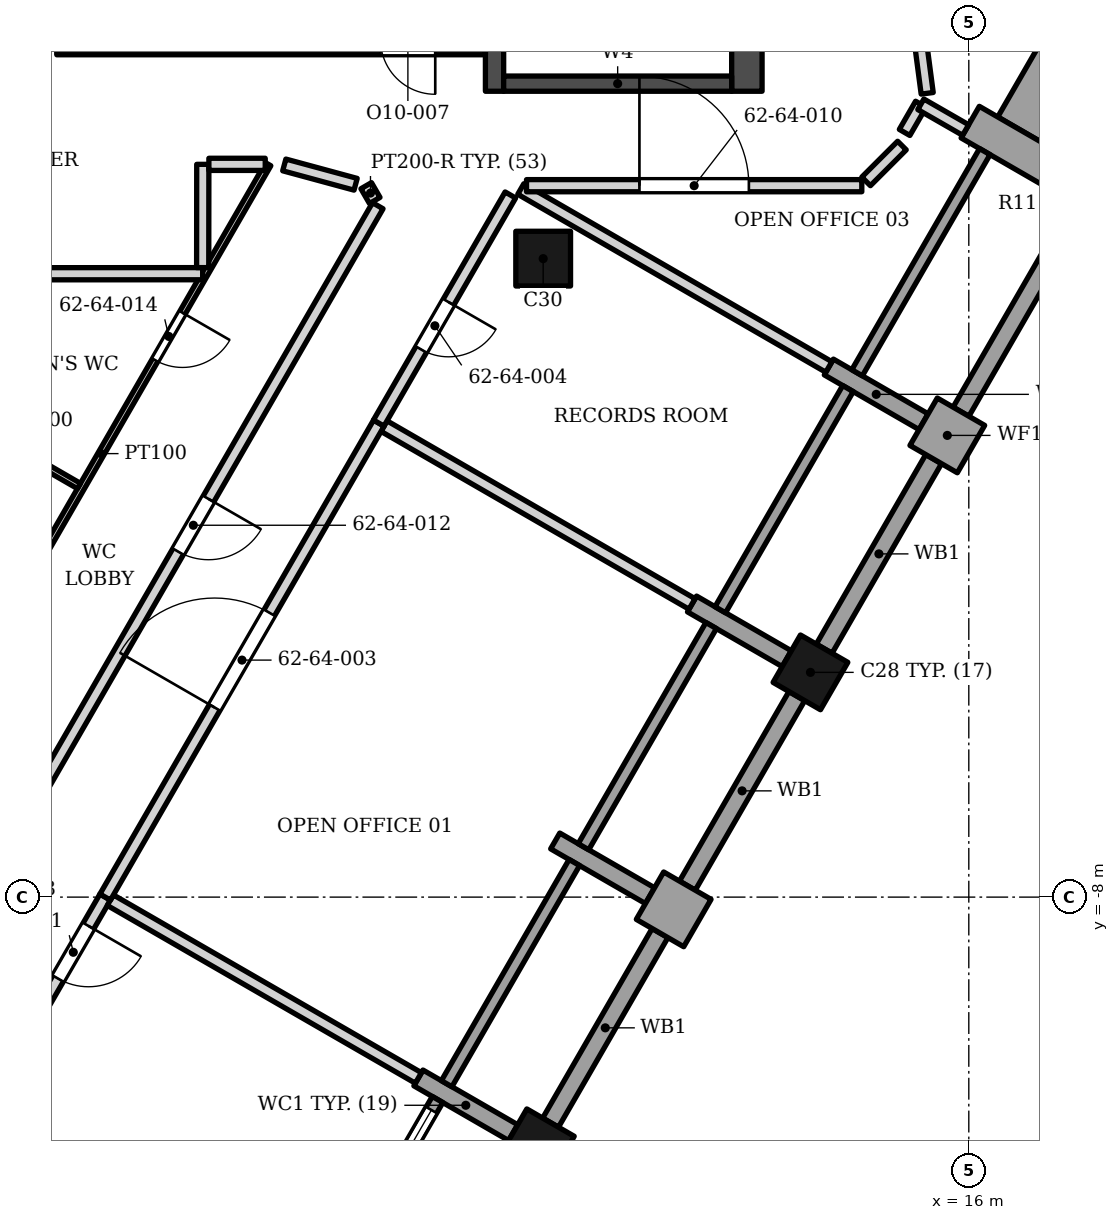
"""IFC4 building model, lengths in metres.
Left out: names, types, materials, properties, quantities, classifications, styles, units other than length and angle.
Written with IfcOpenShell. Run it as: python <this file> out.ifc"""

import sys

from ifc_helpers import new_model, si_unit, direction, frame, frame_2d, origin, origin_2d, place, context, subcontext, project, spatial, polyline, rectangle, outline, extrude, element, fill, save


model = new_model("IFC4")
c1 = context("Model", 3, precision=1e-05, world=origin(), true_north=direction((0.0, 1.0)))
c2 = subcontext(c1, "Body", "Model", "MODEL_VIEW")
j1 = project(units=[si_unit("LENGTHUNIT", "METRE"), si_unit("PLANEANGLEUNIT", "RADIAN")], contexts=[c1])
p1 = place(None, origin())
s1 = spatial("IfcSite", under=j1, at=p1, CompositionType="ELEMENT")
p2 = place(p1, origin())
s2 = spatial("IfcBuilding", under=s1, at=p2, CompositionType="ELEMENT")
p3 = place(p2, frame((0.0, 0.0, 259.9)))
s3 = spatial("IfcBuildingStorey", under=s2, at=p3, CompositionType="ELEMENT", Elevation=259.9)
p4 = place(p3, frame((12.35, 5.253, 0.0), z_axis=(0.0, 0.0, 1.0), x_axis=(0.0, 1.0, 0.0)))
e1 = element("IfcWall", 1, at=p4, inside=s3, PredefinedType="SHEAR", context=c2, shape_type="SweptSolid", body=[
    extrude(rectangle(XDim=13.8, YDim=0.5, at=frame_2d((6.9, 0.0))), origin(), (0.0, 0.0, 1.0), 3.9),
])
p5 = place(p3, frame((8.2, 5.253, 0.0), z_axis=(0.0, 0.0, 1.0), x_axis=(0.0, 1.0, 0.0)))
e2 = element("IfcWall", 2, at=p5, inside=s3, PredefinedType="SHEAR", context=c2, shape_type="SweptSolid", body=[
    extrude(rectangle(XDim=13.3, YDim=0.3, at=frame_2d((6.65, 0.0))), origin(), (0.0, 0.0, 1.0), 3.9),
])
p6 = place(p5, frame((7.1, 0.0, 0.0)))
e3 = element("IfcOpeningElement", 3, at=p6, cuts=e2, PredefinedType="OPENING", context=c2, shape_type="SweptSolid", body=[
    extrude(rectangle(XDim=1.4, YDim=2.1, at=frame_2d((0.7, 1.05))), frame((0.0, 0.16, 0.0), z_axis=(0.0, -1.0, 0.0), x_axis=(1.0, 0.0, 0.0)), (0.0, 0.0, 1.0), 0.32),
])
p7 = place(p5, frame((5.05, 0.0, 0.0)))
e4 = element("IfcOpeningElement", 4, at=p7, cuts=e2, PredefinedType="OPENING", context=c2, shape_type="SweptSolid", body=[
    extrude(rectangle(XDim=1.4, YDim=2.1, at=frame_2d((0.7, 1.05))), frame((0.0, 0.16, 0.0), z_axis=(0.0, -1.0, 0.0), x_axis=(1.0, 0.0, 0.0)), (0.0, 0.0, 1.0), 0.32),
])
p8 = place(p3, frame((8.35, 5.378, 0.0), z_axis=(0.0, 0.0, 1.0), x_axis=(1.0, 0.0, 0.0)))
e5 = element("IfcWall", 5, at=p8, inside=s3, PredefinedType="SHEAR", context=c2, shape_type="SweptSolid", body=[
    extrude(rectangle(XDim=3.75, YDim=0.25, at=frame_2d((1.875, 0.0))), origin(), (0.0, 0.0, 1.0), 3.9),
])
p9 = place(p3, frame((1.0, 6.103, 0.0), z_axis=(0.0, 0.0, 1.0), x_axis=(1.0, 0.0, 0.0)))
e6 = element("IfcWall", 6, at=p9, inside=s3, PredefinedType="SHEAR", context=c2, shape_type="SweptSolid", body=[
    extrude(rectangle(XDim=7.05, YDim=0.5, at=frame_2d((3.525, 0.0))), origin(), (0.0, 0.0, 1.0), 3.9),
])
p10 = place(p9, frame((5.325, 0.0, 0.0)))
e7 = element("IfcOpeningElement", 7, at=p10, cuts=e6, PredefinedType="OPENING", context=c2, shape_type="SweptSolid", body=[
    extrude(rectangle(XDim=0.9, YDim=2.1, at=frame_2d((0.45, 1.05))), frame((0.0, 0.26, 0.0), z_axis=(0.0, -1.0, 0.0), x_axis=(1.0, 0.0, 0.0)), (0.0, 0.0, 1.0), 0.52),
])
for number, where, z_axis, x_axis in (
    (8, (9.0, 2.5, 0.0), (0.0, 0.0, 1.0), (1.0, 0.0, 0.0)),
    (9, (8.896, -12.098, 0.0), (0.0, 0.0, 1.0), (0.5, 0.866, 0.0)),
    (10, (13.396, -4.304, 0.0), (0.0, 0.0, 1.0), (0.5, 0.866, 0.0)),
):
    element("IfcColumn", number, at=place(p3, frame(where, z_axis=z_axis, x_axis=x_axis)), inside=s3, PredefinedType="COLUMN", context=c2, shape_type="SweptSolid", body=[
        extrude(rectangle(XDim=0.9, YDim=0.9, at=origin_2d()), origin(), (0.0, 0.0, 1.0), 3.9),
    ])
p11 = place(p3, frame((6.948, -10.973, 0.0), z_axis=(0.0, 0.0, 1.0), x_axis=(0.866038726271, -0.499976924066, 0.0)))
e11 = element("IfcWall", 11, at=p11, inside=s3, PredefinedType="SOLIDWALL", context=c2, shape_type="SweptSolid", body=[
    extrude(rectangle(XDim=1.799, YDim=0.3, at=frame_2d((0.9, 0.0))), origin(), (0.0, 0.0, 1.0), 2.95),
])
p12 = place(p3, frame((10.921, -8.591, 0.0), z_axis=(0.0, 0.0, 1.0), x_axis=(0.500223362819, 0.865896406789, 0.0)))
e12 = element("IfcWall", 12, at=p12, inside=s3, PredefinedType="SOLIDWALL", context=c2, shape_type="SweptSolid", body=[
    extrude(rectangle(XDim=0.9, YDim=0.9, at=frame_2d((0.45, 0.0))), origin(), (0.0, 0.0, 1.0), 3.0),
])
p13 = place(p3, frame((10.757, -7.976, 0.0), z_axis=(0.0, 0.0, 1.0), x_axis=(-0.865989075817, 0.500062916607, 0.0)))
e13 = element("IfcWall", 13, at=p13, inside=s3, PredefinedType="SOLIDWALL", context=c2, shape_type="SweptSolid", body=[
    extrude(rectangle(XDim=1.8, YDim=0.3, at=frame_2d((0.9, 0.0))), origin(), (0.0, 0.0, 1.0), 3.0),
])
p14 = place(p3, frame((13.006, -4.079, 0.0), z_axis=(0.0, 0.0, 1.0), x_axis=(-0.866038726271, 0.499976924066, 0.0)))
e14 = element("IfcWall", 14, at=p14, inside=s3, PredefinedType="SOLIDWALL", context=c2, shape_type="SweptSolid", body=[
    extrude(rectangle(XDim=1.799, YDim=0.3, at=frame_2d((0.9, 0.0))), origin(), (0.0, 0.0, 1.0), 3.0),
])
p15 = place(p3, frame((15.257, -0.182, 0.0), z_axis=(0.0, 0.0, 1.0), x_axis=(0.865896406789, -0.500223362819, 0.0)))
e15 = element("IfcWall", 15, at=p15, inside=s3, PredefinedType="SOLIDWALL", context=c2, shape_type="SweptSolid", body=[
    extrude(rectangle(XDim=0.9, YDim=0.9, at=frame_2d((0.45, 0.0))), origin(), (0.0, 0.0, 1.0), 3.0),
])
p16 = place(p3, frame((15.257, -0.182, 0.0), z_axis=(0.0, 0.0, 1.0), x_axis=(-0.866047807691, 0.499961193289, 0.0)))
e16 = element("IfcWall", 16, at=p16, inside=s3, PredefinedType="SOLIDWALL", context=c2, shape_type="SweptSolid", body=[
    extrude(rectangle(XDim=1.8, YDim=0.3, at=frame_2d((0.9, 0.0))), origin(), (0.0, 0.0, 1.0), 3.0),
])
p17 = place(p3, frame((16.023, 4.745, 0.0), z_axis=(0.0, 0.0, 1.0), x_axis=(0.865989075817, -0.500062916607, 0.0)))
e17 = element("IfcWall", 17, at=p17, inside=s3, PredefinedType="SOLIDWALL", context=c2, shape_type="SweptSolid", body=[
    extrude(rectangle(XDim=1.8, YDim=0.6, at=frame_2d((0.9, 0.0))), origin(), (0.0, 0.0, 1.0), 2.95),
])
p18 = place(p3, frame((5.163, -14.966, 0.0), z_axis=(0.0, 0.0, 1.0), x_axis=(0.500027713859, 0.866009402589, 0.0)))
e18 = element("IfcWall", 18, at=p18, inside=s3, PredefinedType="ELEMENTEDWALL", context=c2, shape_type="SweptSolid", body=[
    extrude(rectangle(XDim=4.2, YDim=0.2, at=frame_2d((2.1, 0.0))), origin(), (0.0, 0.0, 1.0), 2.95),
])
p19 = place(p18, frame((0.2, 0.0, 0.45)))
e19 = element("IfcOpeningElement", 19, at=p19, cuts=e18, PredefinedType="OPENING", context=c2, shape_type="SweptSolid", body=[
    extrude(rectangle(XDim=3.8, YDim=2.25, at=frame_2d((1.9, 1.125))), frame((0.0, 0.11, 0.0), z_axis=(0.0, -1.0, 0.0), x_axis=(1.0, 0.0, 0.0)), (0.0, 0.0, 1.0), 0.22),
])
p20 = place(p3, frame((9.122, -11.709, 0.0), z_axis=(0.0, 0.0, 1.0), x_axis=(0.499961193289, 0.866047807691, 0.0)))
e20 = element("IfcWall", 20, at=p20, inside=s3, PredefinedType="SOLIDWALL", context=c2, shape_type="SweptSolid", body=[
    extrude(rectangle(XDim=3.6, YDim=0.3, at=frame_2d((1.8, 0.0))), origin(), (0.0, 0.0, 1.0), 3.0),
])
p21 = place(p3, frame((7.413, -11.068, 0.0), z_axis=(0.0, 0.0, 1.0), x_axis=(0.500027713859, 0.866009402589, 0.0)))
e21 = element("IfcWall", 21, at=p21, inside=s3, PredefinedType="ELEMENTEDWALL", context=c2, shape_type="SweptSolid", body=[
    extrude(rectangle(XDim=4.2, YDim=0.2, at=frame_2d((2.1, 0.0))), origin(), (0.0, 0.0, 1.0), 3.0),
])
p22 = place(p3, frame((11.372, -7.812, 0.0), z_axis=(0.0, 0.0, 1.0), x_axis=(0.499961193289, 0.866047807691, 0.0)))
e22 = element("IfcWall", 22, at=p22, inside=s3, PredefinedType="SOLIDWALL", context=c2, shape_type="SweptSolid", body=[
    extrude(rectangle(XDim=3.6, YDim=0.3, at=frame_2d((1.8, 0.0))), origin(), (0.0, 0.0, 1.0), 3.0),
])
p23 = place(p3, frame((9.663, -7.171, 0.0), z_axis=(0.0, 0.0, 1.0), x_axis=(0.500002543286, 0.866023935413, 0.0)))
e23 = element("IfcWall", 23, at=p23, inside=s3, PredefinedType="ELEMENTEDWALL", context=c2, shape_type="SweptSolid", body=[
    extrude(rectangle(XDim=4.2, YDim=0.2, at=frame_2d((2.1, 0.0))), origin(), (0.0, 0.0, 1.0), 3.0),
])
p24 = place(p3, frame((13.622, -3.914, 0.0), z_axis=(0.0, 0.0, 1.0), x_axis=(0.499961193289, 0.866047807691, 0.0)))
e24 = element("IfcWall", 24, at=p24, inside=s3, PredefinedType="SOLIDWALL", context=c2, shape_type="SweptSolid", body=[
    extrude(rectangle(XDim=3.6, YDim=0.3, at=frame_2d((1.8, 0.0))), origin(), (0.0, 0.0, 1.0), 3.0),
])
p25 = place(p3, frame((11.913, -3.274, 0.0), z_axis=(0.0, 0.0, 1.0), x_axis=(0.500027713859, 0.866009402589, 0.0)))
e25 = element("IfcWall", 25, at=p25, inside=s3, PredefinedType="ELEMENTEDWALL", context=c2, shape_type="SweptSolid", body=[
    extrude(rectangle(XDim=4.2, YDim=0.2, at=frame_2d((2.1, 0.0))), origin(), (0.0, 0.0, 1.0), 3.0),
])
p26 = place(p3, frame((15.872, -0.017, 0.0), z_axis=(0.0, 0.0, 1.0), x_axis=(0.499990559667, 0.866030854095, 0.0)))
e26 = element("IfcWall", 26, at=p26, inside=s3, PredefinedType="SOLIDWALL", context=c2, shape_type="SweptSolid", body=[
    extrude(rectangle(XDim=3.6, YDim=0.3, at=frame_2d((1.8, 0.0))), origin(), (0.0, 0.0, 1.0), 3.0),
])
p27 = place(p3, frame((14.163, 0.623, 0.0), z_axis=(0.0, 0.0, 1.0), x_axis=(0.500002543286, 0.866023935413, 0.0)))
e27 = element("IfcWall", 27, at=p27, inside=s3, PredefinedType="ELEMENTEDWALL", context=c2, shape_type="SweptSolid", body=[
    extrude(rectangle(XDim=4.2, YDim=0.2, at=frame_2d((2.1, 0.0))), origin(), (0.0, 0.0, 1.0), 2.95),
])
p28 = place(p3, origin())
e28 = element("IfcWall", 28, at=p28, inside=s3, PredefinedType="SOLIDWALL", context=c2, shape_type="SweptSolid", body=[
    extrude(outline(polyline([(18.236, 7.878), (16.476, 4.83), (18.511, 3.655), (20.271, 6.703), (18.236, 7.878)])), origin(), (0.0, 0.0, 1.0), 2.974),
])
p29 = place(p3, frame((0.594, -10.08, 0.0), z_axis=(0.0, 0.0, 1.0), x_axis=(0.500575540498, 0.865692860231, 0.0)))
e29 = element("IfcWall", 29, at=p29, inside=s3, PredefinedType="PARTITIONING", context=c2, shape_type="SweptSolid", body=[
    extrude(rectangle(XDim=2.403, YDim=0.2, at=frame_2d((1.201, 0.0))), origin(), (0.0, 0.0, 1.0), 3.73),
])
p30 = place(p29, frame((0.854, 0.0, 0.0)))
e30 = element("IfcOpeningElement", 30, at=p30, cuts=e29, PredefinedType="OPENING", context=c2, shape_type="SweptSolid", body=[
    extrude(rectangle(XDim=1.0, YDim=2.1, at=frame_2d((0.5, 1.05))), frame((0.0, 0.11, 0.0), z_axis=(0.0, -1.0, 0.0), x_axis=(1.0, 0.0, 0.0)), (0.0, 0.0, 1.0), 0.22),
])
p31 = place(p3, frame((1.881, -8.05, 0.0), z_axis=(0.0, 0.0, 1.0), x_axis=(0.86614736797, -0.499788692307, 0.0)))
e31 = element("IfcWall", 31, at=p31, inside=s3, PredefinedType="PARTITIONING", context=c2, shape_type="SweptSolid", body=[
    extrude(rectangle(XDim=5.85, YDim=0.2, at=frame_2d((2.925, 0.0))), origin(), (0.0, 0.0, 1.0), 2.884),
])
p32 = place(p3, frame((0.212, -7.139, 0.0), z_axis=(0.0, 0.0, 1.0), x_axis=(0.499990649477, 0.866030802244, 0.0)))
e32 = element("IfcWall", 32, at=p32, inside=s3, PredefinedType="PARTITIONING", context=c2, shape_type="SweptSolid", body=[
    extrude(rectangle(XDim=12.135, YDim=0.2, at=frame_2d((6.067, 0.0))), origin(), (0.0, 0.0, 1.0), 2.884),
])
p33 = place(p32, frame((5.567, 0.0, 0.0)))
e33 = element("IfcOpeningElement", 33, at=p33, cuts=e32, PredefinedType="OPENING", context=c2, shape_type="SweptSolid", body=[
    extrude(rectangle(XDim=1.0, YDim=2.1, at=frame_2d((0.5, 1.05))), frame((0.0, 0.11, 0.0), z_axis=(0.0, -1.0, 0.0), x_axis=(1.0, 0.0, 0.0)), (0.0, 0.0, 1.0), 0.22),
])
p34 = place(p3, frame((-1.017, -5.465, 0.0), z_axis=(0.0, 0.0, 1.0), x_axis=(0.499983334908, 0.866035025166, 0.0)))
e34 = element("IfcWall", 34, at=p34, inside=s3, PredefinedType="PARTITIONING", context=c2, shape_type="SweptSolid", body=[
    extrude(rectangle(XDim=10.99, YDim=0.1, at=frame_2d((5.495, 0.0))), origin(), (0.0, 0.0, 1.0), 2.884),
])
p35 = place(p34, frame((1.915, 0.0, 0.0)))
e35 = element("IfcOpeningElement", 35, at=p35, cuts=e34, PredefinedType="OPENING", context=c2, shape_type="SweptSolid", body=[
    extrude(rectangle(XDim=0.9, YDim=2.1, at=frame_2d((0.45, 1.05))), frame((0.0, 0.06, 0.0), z_axis=(0.0, -1.0, 0.0), x_axis=(1.0, 0.0, 0.0)), (0.0, 0.0, 1.0), 0.12),
])
p36 = place(p34, frame((7.271, 0.0, 0.0)))
e36 = element("IfcOpeningElement", 36, at=p36, cuts=e34, PredefinedType="OPENING", context=c2, shape_type="SweptSolid", body=[
    extrude(rectangle(XDim=0.9, YDim=2.1, at=frame_2d((0.45, 1.05))), frame((0.0, 0.06, 0.0), z_axis=(0.0, -1.0, 0.0), x_axis=(1.0, 0.0, 0.0)), (0.0, 0.0, 1.0), 0.12),
])
p37 = place(p3, frame((6.382, -0.254, 0.0), z_axis=(0.0, 0.0, 1.0), x_axis=(0.866018092707, -0.500012662943, 0.0)))
e37 = element("IfcWall", 37, at=p37, inside=s3, PredefinedType="PARTITIONING", context=c2, shape_type="SweptSolid", body=[
    extrude(rectangle(XDim=5.85, YDim=0.2, at=frame_2d((2.925, 0.0))), origin(), (0.0, 0.0, 1.0), 3.052),
])
p38 = place(p3, frame((1.797, -7.999, 0.0), z_axis=(0.0, 0.0, 1.0), x_axis=(0.5000018851, 0.866024315419, 0.0)))
e38 = element("IfcWall", 38, at=p38, inside=s3, PredefinedType="PARTITIONING", context=c2, shape_type="SweptSolid", body=[
    extrude(rectangle(XDim=9.0, YDim=0.2, at=frame_2d((4.5, 0.0))), origin(), (0.0, 0.0, 1.0), 2.884),
])
p39 = place(p38, frame((3.6, 0.0, 0.0)))
e39 = element("IfcOpeningElement", 39, at=p39, cuts=e38, PredefinedType="OPENING", context=c2, shape_type="SweptSolid", body=[
    extrude(rectangle(XDim=1.8, YDim=2.4, at=frame_2d((0.9, 1.2))), frame((0.0, 0.11, 0.0), z_axis=(0.0, -1.0, 0.0), x_axis=(1.0, 0.0, 0.0)), (0.0, 0.0, 1.0), 0.22),
])
p40 = place(p3, frame((6.295, -0.204, 0.0), z_axis=(0.0, 0.0, 1.0), x_axis=(0.499964815505, 0.866045716609, 0.0)))
e40 = element("IfcWall", 40, at=p40, inside=s3, PredefinedType="PARTITIONING", context=c2, shape_type="SweptSolid", body=[
    extrude(rectangle(XDim=4.331, YDim=0.2, at=frame_2d((2.166, 0.0))), origin(), (0.0, 0.0, 1.0), 3.73),
])
p41 = place(p40, frame((1.397, 0.0, 0.0)))
e41 = element("IfcOpeningElement", 41, at=p41, cuts=e40, PredefinedType="OPENING", context=c2, shape_type="SweptSolid", body=[
    extrude(rectangle(XDim=0.9, YDim=2.1, at=frame_2d((0.45, 1.05))), frame((0.0, 0.11, 0.0), z_axis=(0.0, -1.0, 0.0), x_axis=(1.0, 0.0, 0.0)), (0.0, 0.0, 1.0), 0.22),
])
p42 = place(p3, frame((-1.128, 0.2, 0.0), z_axis=(0.0, 0.0, 1.0), x_axis=(0.866037287897, -0.499979415547, 0.0)))
e42 = element("IfcWall", 42, at=p42, inside=s3, PredefinedType="PARTITIONING", context=c2, shape_type="SweptSolid", body=[
    extrude(rectangle(XDim=2.878, YDim=0.1, at=frame_2d((1.439, 0.0))), origin(), (0.0, 0.0, 1.0), 2.884),
])
p43 = place(p3, frame((-1.126, 2.25, 0.0), z_axis=(0.0, 0.0, 1.0), x_axis=(0.999999906884, 0.000431545973, 0.0)))
e43 = element("IfcWall", 43, at=p43, inside=s3, PredefinedType="PARTITIONING", context=c2, shape_type="SweptSolid", body=[
    extrude(rectangle(XDim=4.526, YDim=0.2, at=frame_2d((2.263, 0.0))), origin(), (0.0, 0.0, 1.0), 3.73),
])
p44 = place(p3, frame((6.09, 3.7, 0.0), z_axis=(0.0, 0.0, 1.0), x_axis=(0.499973348067, -0.866040790738, 0.0)))
e44 = element("IfcWall", 44, at=p44, inside=s3, PredefinedType="PARTITIONING", context=c2, shape_type="SweptSolid", body=[
    extrude(rectangle(XDim=0.281, YDim=0.2, at=frame_2d((0.14, 0.0))), origin(), (0.0, 0.0, 1.0), 3.73),
])
p45 = place(p3, frame((8.632, 3.645, 0.0), z_axis=(0.0, 0.0, 1.0), x_axis=(0.865909656502, -0.500200426606, 0.0)))
e45 = element("IfcWall", 45, at=p45, inside=s3, PredefinedType="PARTITIONING", context=c2, shape_type="SweptSolid", body=[
    extrude(rectangle(XDim=5.851, YDim=0.2, at=frame_2d((2.925, 0.0))), origin(), (0.0, 0.0, 1.0), 3.052),
])
p46 = place(p3, frame((8.726, 3.699, 0.0), z_axis=(0.0, 0.0, 1.0), x_axis=(1.0, 0.0, 0.0)))
e46 = element("IfcWall", 46, at=p46, inside=s3, PredefinedType="PARTITIONING", context=c2, shape_type="SweptSolid", body=[
    extrude(rectangle(XDim=5.514, YDim=0.2, at=frame_2d((2.757, 0.0))), origin(), (0.0, 0.0, 1.0), 3.282),
])
p47 = place(p46, frame((1.857, 0.0, 0.0)))
e47 = element("IfcOpeningElement", 47, at=p47, cuts=e46, PredefinedType="OPENING", context=c2, shape_type="SweptSolid", body=[
    extrude(rectangle(XDim=1.8, YDim=2.4, at=frame_2d((0.9, 1.2))), frame((0.0, 0.11, 0.0), z_axis=(0.0, -1.0, 0.0), x_axis=(1.0, 0.0, 0.0)), (0.0, 0.0, 1.0), 0.22),
])
p48 = place(p3, frame((4.742, 4.041, 0.0), z_axis=(0.0, 0.0, 1.0), x_axis=(0.965129144807, -0.261774203931, 0.0)))
e48 = element("IfcWall", 48, at=p48, inside=s3, PredefinedType="PARTITIONING", context=c2, shape_type="SweptSolid", body=[
    extrude(rectangle(XDim=1.215, YDim=0.2, at=frame_2d((0.608, 0.0))), origin(), (0.0, 0.0, 1.0), 2.884),
])
p49 = place(p3, frame((3.4, 2.352, 0.0), z_axis=(0.0, 0.0, 1.0), x_axis=(0.001150085496, 0.999999338651, 0.0)))
e49 = element("IfcWall", 49, at=p49, inside=s3, PredefinedType="PARTITIONING", context=c2, shape_type="SweptSolid", body=[
    extrude(rectangle(XDim=1.698, YDim=0.2, at=frame_2d((0.849, 0.0))), origin(), (0.0, 0.0, 1.0), 3.73),
])
p50 = place(p3, frame((3.502, 4.051, 0.0), z_axis=(0.0, 0.0, 1.0), x_axis=(1.0, 0.0, 0.0)))
e50 = element("IfcWall", 50, at=p50, inside=s3, PredefinedType="PARTITIONING", context=c2, shape_type="SweptSolid", body=[
    extrude(rectangle(XDim=0.927, YDim=0.2, at=frame_2d((0.463, 0.0))), origin(), (0.0, 0.0, 1.0), 2.884),
])
p51 = place(p3, frame((14.311, 3.77, 0.0), z_axis=(0.0, 0.0, 1.0), x_axis=(0.707253195258, 0.706960336792, 0.0)))
e51 = element("IfcWall", 51, at=p51, inside=s3, PredefinedType="PARTITIONING", context=c2, shape_type="SweptSolid", body=[
    extrude(rectangle(XDim=0.834, YDim=0.2, at=frame_2d((0.417, 0.0))), origin(), (0.0, 0.0, 1.0), 3.73),
])
p52 = place(p3, frame((14.944, 4.575, 0.0), z_axis=(0.0, 0.0, 1.0), x_axis=(0.500209224752, 0.865904574115, 0.0)))
e52 = element("IfcWall", 52, at=p52, inside=s3, PredefinedType="PARTITIONING", context=c2, shape_type="SweptSolid", body=[
    extrude(rectangle(XDim=0.535, YDim=0.2, at=frame_2d((0.268, 0.0))), origin(), (0.0, 0.0, 1.0), 2.95),
])
p53 = place(p3, frame((15.211, 5.038, 0.0), z_axis=(0.0, 0.0, 1.0), x_axis=(0.867126672162, -0.498087677447, 0.0)))
e53 = element("IfcWall", 53, at=p53, inside=s3, PredefinedType="PARTITIONING", context=c2, shape_type="SweptSolid", body=[
    extrude(rectangle(XDim=0.849, YDim=0.2, at=frame_2d((0.425, 0.0))), origin(), (0.0, 0.0, 1.0), 2.95),
])
p54 = place(p3, frame((15.211, 6.016, 0.0), z_axis=(0.0, 0.0, 1.0), x_axis=(0.130572336197, -0.991438785312, 0.0)))
e54 = element("IfcWall", 54, at=p54, inside=s3, PredefinedType="PARTITIONING", context=c2, shape_type="SweptSolid", body=[
    extrude(rectangle(XDim=0.804, YDim=0.2, at=frame_2d((0.402, 0.0))), origin(), (0.0, 0.0, 1.0), 3.73),
])
p55 = place(p19, origin())
e55 = element("IfcWindow", 55, at=p55, inside=s3, PartitioningType="SINGLE_PANEL", PredefinedType="WINDOW", context=c2, shape_type="SweptSolid", body=[
    extrude(rectangle(XDim=3.8, YDim=2.25, at=frame_2d((1.9, 1.125))), frame((0.0, 0.03, 0.0), z_axis=(0.0, -1.0, 0.0), x_axis=(1.0, 0.0, 0.0)), (0.0, 0.0, 1.0), 0.06),
])
fill(e19, e55)
p56 = place(p39, origin())
e56 = element("IfcDoor", 56, at=p56, inside=s3, OperationType="DOUBLE_DOOR_SINGLE_SWING", PredefinedType="DOOR", context=c2, shape_type="SweptSolid", body=[
    extrude(rectangle(XDim=1.8, YDim=2.4, at=frame_2d((0.9, 1.2))), frame((0.0, 0.025, 0.0), z_axis=(0.0, -1.0, 0.0), x_axis=(1.0, 0.0, 0.0)), (0.0, 0.0, 1.0), 0.05),
])
fill(e39, e56)
p57 = place(p41, origin())
e57 = element("IfcDoor", 57, at=p57, inside=s3, OperationType="SINGLE_SWING_RIGHT", PredefinedType="DOOR", context=c2, shape_type="SweptSolid", body=[
    extrude(rectangle(XDim=0.9, YDim=2.1, at=frame_2d((0.45, 1.05))), frame((0.0, 0.025, 0.0), z_axis=(0.0, -1.0, 0.0), x_axis=(1.0, 0.0, 0.0)), (0.0, 0.0, 1.0), 0.05),
])
fill(e41, e57)
p58 = place(p47, origin())
e58 = element("IfcDoor", 58, at=p58, inside=s3, OperationType="DOUBLE_DOOR_SINGLE_SWING", PredefinedType="DOOR", context=c2, shape_type="SweptSolid", body=[
    extrude(rectangle(XDim=1.8, YDim=2.4, at=frame_2d((0.9, 1.2))), frame((0.0, 0.025, 0.0), z_axis=(0.0, -1.0, 0.0), x_axis=(1.0, 0.0, 0.0)), (0.0, 0.0, 1.0), 0.05),
])
fill(e47, e58)
p59 = place(p30, origin())
e59 = element("IfcDoor", 59, at=p59, inside=s3, OperationType="SINGLE_SWING_RIGHT", PredefinedType="DOOR", context=c2, shape_type="SweptSolid", body=[
    extrude(rectangle(XDim=1.0, YDim=2.1, at=frame_2d((0.5, 1.05))), frame((0.0, 0.025, 0.0), z_axis=(0.0, -1.0, 0.0), x_axis=(1.0, 0.0, 0.0)), (0.0, 0.0, 1.0), 0.05),
])
fill(e30, e59)
p60 = place(p33, origin())
e60 = element("IfcDoor", 60, at=p60, inside=s3, OperationType="SINGLE_SWING_RIGHT", PredefinedType="DOOR", context=c2, shape_type="SweptSolid", body=[
    extrude(rectangle(XDim=1.0, YDim=2.1, at=frame_2d((0.5, 1.05))), frame((0.0, 0.025, 0.0), z_axis=(0.0, -1.0, 0.0), x_axis=(1.0, 0.0, 0.0)), (0.0, 0.0, 1.0), 0.05),
])
fill(e33, e60)
p61 = place(p36, origin())
e61 = element("IfcDoor", 61, at=p61, inside=s3, OperationType="SINGLE_SWING_RIGHT", PredefinedType="DOOR", context=c2, shape_type="SweptSolid", body=[
    extrude(rectangle(XDim=0.9, YDim=2.1, at=frame_2d((0.45, 1.05))), frame((0.0, 0.025, 0.0), z_axis=(0.0, -1.0, 0.0), x_axis=(1.0, 0.0, 0.0)), (0.0, 0.0, 1.0), 0.05),
])
fill(e36, e61)
save(model, sys.argv[1])
